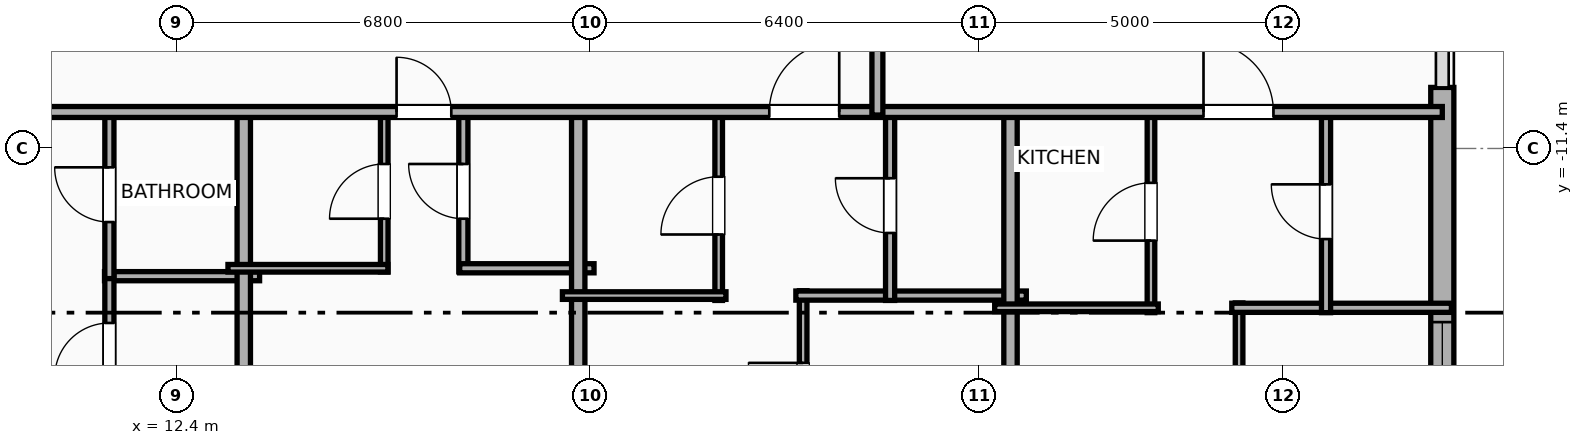
"""IFC4 building model, lengths in metres.
Left out: names, types, materials, properties, quantities, classifications, styles, units other than length and angle.
Written with IfcOpenShell. Run it as: python <this file> out.ifc"""

import sys

from ifc_helpers import new_model, si_unit, direction, frame, frame_2d, origin, place, context, subcontext, project, spatial, rectangle, extrude, element, fill, save


model = new_model("IFC4")
c1 = context("Model", 3, precision=1e-05, world=origin(), true_north=direction((0.0, 1.0)))
c2 = subcontext(c1, "Body", "Model", "MODEL_VIEW")
j1 = project(units=[si_unit("LENGTHUNIT", "METRE"), si_unit("PLANEANGLEUNIT", "RADIAN")], contexts=[c1])
p1 = place(None, origin())
s1 = spatial("IfcSite", under=j1, at=p1, CompositionType="ELEMENT")
p2 = place(p1, origin())
s2 = spatial("IfcBuilding", under=s1, at=p2, CompositionType="ELEMENT")
p3 = place(p2, frame((0.0, 0.0, 85.8)))
s3 = spatial("IfcBuildingStorey", under=s2, at=p3, CompositionType="ELEMENT", Elevation=85.8)
p4 = place(p3, frame((33.21, -10.396, 0.0), z_axis=(0.0, 0.0, 1.0), x_axis=(0.0, -1.0, 0.0)))
e1 = element("IfcWall", 1, at=p4, inside=s3, PredefinedType="ELEMENTEDWALL", context=c2, shape_type="SweptSolid", body=[
    extrude(rectangle(XDim=6.185, YDim=0.38, at=frame_2d((3.093, 0.0))), origin(), (0.0, 0.0, 1.0), 2.54),
])
p5 = place(p4, frame((3.86, 0.0, 0.55)))
e2 = element("IfcOpeningElement", 2, at=p5, cuts=e1, PredefinedType="OPENING", context=c2, shape_type="SweptSolid", body=[
    extrude(rectangle(XDim=1.2, YDim=1.15, at=frame_2d((0.6, 0.575))), frame((0.0, 0.2, 0.0), z_axis=(0.0, -1.0, 0.0), x_axis=(1.0, 0.0, 0.0)), (0.0, 0.0, 1.0), 0.4),
])
p6 = place(p3, frame((11.21, -13.5, 0.0), z_axis=(0.0, 0.0, 1.0), x_axis=(1.0, 0.0, 0.0)))
e3 = element("IfcWall", 3, at=p6, inside=s3, PredefinedType="PLUMBINGWALL", context=c2, shape_type="SweptSolid", body=[
    extrude(rectangle(XDim=2.55, YDim=0.15, at=frame_2d((1.275, 0.0))), origin(), (0.0, 0.0, 1.0), 3.65),
])
p7 = place(p3, frame((11.29, -20.458, 0.0), z_axis=(0.0, 0.0, 1.0), x_axis=(0.0, 1.0, 0.0)))
e4 = element("IfcWall", 4, at=p7, inside=s3, PredefinedType="PLUMBINGWALL", context=c2, shape_type="SweptSolid", body=[
    extrude(rectangle(XDim=6.998, YDim=0.15, at=frame_2d((3.499, 0.0))), origin(), (0.0, 0.0, 1.0), 3.65),
])
p8 = place(p7, frame((5.288, 0.0, 0.0)))
e5 = element("IfcOpeningElement", 5, at=p8, cuts=e4, PredefinedType="OPENING", context=c2, shape_type="SweptSolid", body=[
    extrude(rectangle(XDim=0.9, YDim=2.05, at=frame_2d((0.45, 1.025))), frame((0.0, 0.085, 0.0), z_axis=(0.0, -1.0, 0.0), x_axis=(1.0, 0.0, 0.0)), (0.0, 0.0, 1.0), 0.17),
])
p9 = place(p3, frame((11.29, -13.54, 0.0), z_axis=(0.0, 0.0, 1.0), x_axis=(0.0, 1.0, 0.0)))
e6 = element("IfcWall", 6, at=p9, inside=s3, PredefinedType="PLUMBINGWALL", context=c2, shape_type="SweptSolid", body=[
    extrude(rectangle(XDim=2.76, YDim=0.15, at=frame_2d((1.38, 0.0))), origin(), (0.0, 0.0, 1.0), 3.65),
])
p10 = place(p9, frame((0.93, 0.0, 0.0)))
e7 = element("IfcOpeningElement", 7, at=p10, cuts=e6, PredefinedType="OPENING", context=c2, shape_type="SweptSolid", body=[
    extrude(rectangle(XDim=0.9, YDim=2.05, at=frame_2d((0.45, 1.025))), frame((0.0, 0.085, 0.0), z_axis=(0.0, -1.0, 0.0), x_axis=(1.0, 0.0, 0.0)), (0.0, 0.0, 1.0), 0.17),
])
p11 = place(p3, frame((13.5, -20.41, 0.0), z_axis=(0.0, 0.0, 1.0), x_axis=(0.0, 1.0, 0.0)))
e8 = element("IfcWall", 8, at=p11, inside=s3, PredefinedType="PARTITIONING", context=c2, shape_type="SweptSolid", body=[
    extrude(rectangle(XDim=9.69, YDim=0.22, at=frame_2d((4.845, 0.0))), origin(), (0.0, 0.0, 1.0), 3.65),
])
p12 = place(p3, frame((15.81, -13.43, 0.0), z_axis=(0.0, 0.0, 1.0), x_axis=(0.0, 1.0, 0.0)))
e9 = element("IfcWall", 9, at=p12, inside=s3, PredefinedType="PARTITIONING", context=c2, shape_type="SweptSolid", body=[
    extrude(rectangle(XDim=2.65, YDim=0.125, at=frame_2d((1.325, 0.0))), origin(), (0.0, 0.0, 1.0), 3.65),
])
p13 = place(p12, frame((0.875, 0.0, 0.0)))
e10 = element("IfcOpeningElement", 10, at=p13, cuts=e9, PredefinedType="OPENING", context=c2, shape_type="SweptSolid", body=[
    extrude(rectangle(XDim=0.9, YDim=2.05, at=frame_2d((0.45, 1.025))), frame((0.0, 0.073, 0.0), z_axis=(0.0, -1.0, 0.0), x_axis=(1.0, 0.0, 0.0)), (0.0, 0.0, 1.0), 0.145),
])
p14 = place(p3, frame((17.111, -13.43, 0.0), z_axis=(0.0, 0.0, 1.0), x_axis=(0.0, 1.0, 0.0)))
e11 = element("IfcWall", 11, at=p14, inside=s3, PredefinedType="PLUMBINGWALL", context=c2, shape_type="SweptSolid", body=[
    extrude(rectangle(XDim=2.65, YDim=0.15, at=frame_2d((1.325, 0.0))), origin(), (0.0, 0.0, 1.0), 3.65),
])
p15 = place(p14, frame((0.875, 0.0, 0.0)))
e12 = element("IfcOpeningElement", 12, at=p15, cuts=e11, PredefinedType="OPENING", context=c2, shape_type="SweptSolid", body=[
    extrude(rectangle(XDim=0.9, YDim=2.05, at=frame_2d((0.45, 1.025))), frame((0.0, 0.085, 0.0), z_axis=(0.0, -1.0, 0.0), x_axis=(1.0, 0.0, 0.0)), (0.0, 0.0, 1.0), 0.17),
])
p16 = place(p3, frame((13.24, -13.37, 0.0), z_axis=(0.0, 0.0, 1.0), x_axis=(1.0, 0.0, 0.0)))
e13 = element("IfcWall", 13, at=p16, inside=s3, PredefinedType="PARTITIONING", context=c2, shape_type="SweptSolid", body=[
    extrude(rectangle(XDim=2.63, YDim=0.125, at=frame_2d((1.315, 0.0))), origin(), (0.0, 0.0, 1.0), 3.65),
])
p17 = place(p3, frame((17.051, -13.37, 0.0), z_axis=(0.0, 0.0, 1.0), x_axis=(1.0, 0.0, 0.0)))
e14 = element("IfcWall", 14, at=p17, inside=s3, PredefinedType="PLUMBINGWALL", context=c2, shape_type="SweptSolid", body=[
    extrude(rectangle(XDim=2.209, YDim=0.15, at=frame_2d((1.104, 0.0))), origin(), (0.0, 0.0, 1.0), 3.65),
])
p18 = place(p3, frame((19.0, -20.41, 0.0), z_axis=(0.0, 0.0, 1.0), x_axis=(0.0, 1.0, 0.0)))
e15 = element("IfcWall", 15, at=p18, inside=s3, PredefinedType="PARTITIONING", context=c2, shape_type="SweptSolid", body=[
    extrude(rectangle(XDim=9.69, YDim=0.22, at=frame_2d((4.845, 0.0))), origin(), (0.0, 0.0, 1.0), 2.54),
])
p19 = place(p3, frame((22.699, -20.56, 0.0), z_axis=(0.0, 0.0, 1.0), x_axis=(0.0, 1.0, 0.0)))
e16 = element("IfcWall", 16, at=p19, inside=s3, PredefinedType="PARTITIONING", context=c2, shape_type="SweptSolid", body=[
    extrude(rectangle(XDim=6.821, YDim=0.125, at=frame_2d((3.411, 0.0))), origin(), (0.0, 0.0, 1.0), 3.65),
])
p20 = place(p19, frame((4.734, 0.0, 0.0)))
e17 = element("IfcOpeningElement", 17, at=p20, cuts=e16, PredefinedType="OPENING", context=c2, shape_type="SweptSolid", body=[
    extrude(rectangle(XDim=0.9, YDim=2.05, at=frame_2d((0.45, 1.025))), frame((0.0, 0.073, 0.0), z_axis=(0.0, -1.0, 0.0), x_axis=(1.0, 0.0, 0.0)), (0.0, 0.0, 1.0), 0.145),
])
p21 = place(p3, frame((22.579, -13.819, 0.0), z_axis=(0.0, 0.0, 1.0), x_axis=(1.0, 0.0, 0.0)))
e18 = element("IfcWall", 18, at=p21, inside=s3, PredefinedType="PLUMBINGWALL", context=c2, shape_type="SweptSolid", body=[
    extrude(rectangle(XDim=3.79, YDim=0.15, at=frame_2d((1.895, 0.0))), origin(), (0.0, 0.0, 1.0), 3.65),
])
p22 = place(p3, frame((21.31, -13.899, 0.0), z_axis=(0.0, 0.0, 1.0), x_axis=(0.0, 1.0, 0.0)))
e19 = element("IfcWall", 19, at=p22, inside=s3, PredefinedType="PARTITIONING", context=c2, shape_type="SweptSolid", body=[
    extrude(rectangle(XDim=3.119, YDim=0.125, at=frame_2d((1.56, 0.0))), origin(), (0.0, 0.0, 1.0), 3.65),
])
p23 = place(p22, frame((1.084, 0.0, 0.0)))
e20 = element("IfcOpeningElement", 20, at=p23, cuts=e19, PredefinedType="OPENING", context=c2, shape_type="SweptSolid", body=[
    extrude(rectangle(XDim=0.95, YDim=2.05, at=frame_2d((0.475, 1.025))), frame((0.0, 0.073, 0.0), z_axis=(0.0, -1.0, 0.0), x_axis=(1.0, 0.0, 0.0)), (0.0, 0.0, 1.0), 0.145),
])
p24 = place(p3, frame((18.74, -13.819, 0.0), z_axis=(0.0, 0.0, 1.0), x_axis=(1.0, 0.0, 0.0)))
e21 = element("IfcWall", 21, at=p24, inside=s3, PredefinedType="PARTITIONING", context=c2, shape_type="SweptSolid", body=[
    extrude(rectangle(XDim=2.69, YDim=0.125, at=frame_2d((1.345, 0.0))), origin(), (0.0, 0.0, 1.0), 3.65),
])
p25 = place(p3, frame((24.129, -13.899, 0.0), z_axis=(0.0, 0.0, 1.0), x_axis=(0.0, 1.0, 0.0)))
e22 = element("IfcWall", 22, at=p25, inside=s3, PredefinedType="PLUMBINGWALL", context=c2, shape_type="SweptSolid", body=[
    extrude(rectangle(XDim=3.119, YDim=0.15, at=frame_2d((1.56, 0.0))), origin(), (0.0, 0.0, 1.0), 3.65),
])
p26 = place(p25, frame((1.11, 0.0, 0.0)))
e23 = element("IfcOpeningElement", 23, at=p26, cuts=e22, PredefinedType="OPENING", context=c2, shape_type="SweptSolid", body=[
    extrude(rectangle(XDim=0.9, YDim=2.05, at=frame_2d((0.45, 1.025))), frame((0.0, 0.085, 0.0), z_axis=(0.0, -1.0, 0.0), x_axis=(1.0, 0.0, 0.0)), (0.0, 0.0, 1.0), 0.17),
])
p27 = place(p3, frame((26.109, -20.41, 0.0), z_axis=(0.0, 0.0, 1.0), x_axis=(0.0, 1.0, 0.0)))
e24 = element("IfcWall", 24, at=p27, inside=s3, PredefinedType="PARTITIONING", context=c2, shape_type="SweptSolid", body=[
    extrude(rectangle(XDim=9.69, YDim=0.22, at=frame_2d((4.845, 0.0))), origin(), (0.0, 0.0, 1.0), 3.65),
])
p28 = place(p3, frame((29.868, -20.466, 0.0), z_axis=(0.0, 0.0, 1.0), x_axis=(0.0, 1.0, 0.0)))
e25 = element("IfcWall", 25, at=p28, inside=s3, PredefinedType="PARTITIONING", context=c2, shape_type="SweptSolid", body=[
    extrude(rectangle(XDim=6.526, YDim=0.125, at=frame_2d((3.263, 0.0))), origin(), (0.0, 0.0, 1.0), 3.65),
])
p29 = place(p28, frame((4.51, 0.0, 0.0)))
e26 = element("IfcOpeningElement", 26, at=p29, cuts=e25, PredefinedType="OPENING", context=c2, shape_type="SweptSolid", body=[
    extrude(rectangle(XDim=0.9, YDim=2.05, at=frame_2d((0.45, 1.025))), frame((0.0, 0.073, 0.0), z_axis=(0.0, -1.0, 0.0), x_axis=(1.0, 0.0, 0.0)), (0.0, 0.0, 1.0), 0.145),
])
p30 = place(p3, frame((29.748, -14.02, 0.0), z_axis=(0.0, 0.0, 1.0), x_axis=(1.0, 0.0, 0.0)))
e27 = element("IfcWall", 27, at=p30, inside=s3, PredefinedType="PLUMBINGWALL", context=c2, shape_type="SweptSolid", body=[
    extrude(rectangle(XDim=3.612, YDim=0.15, at=frame_2d((1.806, 0.0))), origin(), (0.0, 0.0, 1.0), 3.65),
])
p31 = place(p3, frame((28.419, -14.1, 0.0), z_axis=(0.0, 0.0, 1.0), x_axis=(0.0, 1.0, 0.0)))
e28 = element("IfcWall", 28, at=p31, inside=s3, PredefinedType="PARTITIONING", context=c2, shape_type="SweptSolid", body=[
    extrude(rectangle(XDim=3.32, YDim=0.125, at=frame_2d((1.66, 0.0))), origin(), (0.0, 0.0, 1.0), 3.65),
])
p32 = place(p31, frame((1.185, 0.0, 0.0)))
e29 = element("IfcOpeningElement", 29, at=p32, cuts=e28, PredefinedType="OPENING", context=c2, shape_type="SweptSolid", body=[
    extrude(rectangle(XDim=0.95, YDim=2.05, at=frame_2d((0.475, 1.025))), frame((0.0, 0.073, 0.0), z_axis=(0.0, -1.0, 0.0), x_axis=(1.0, 0.0, 0.0)), (0.0, 0.0, 1.0), 0.145),
])
p33 = place(p3, frame((25.849, -14.02, 0.0), z_axis=(0.0, 0.0, 1.0), x_axis=(1.0, 0.0, 0.0)))
e30 = element("IfcWall", 30, at=p33, inside=s3, PredefinedType="PARTITIONING", context=c2, shape_type="SweptSolid", body=[
    extrude(rectangle(XDim=2.69, YDim=0.125, at=frame_2d((1.345, 0.0))), origin(), (0.0, 0.0, 1.0), 3.65),
])
p34 = place(p3, frame((31.298, -14.1, 0.0), z_axis=(0.0, 0.0, 1.0), x_axis=(0.0, 1.0, 0.0)))
e31 = element("IfcWall", 31, at=p34, inside=s3, PredefinedType="PLUMBINGWALL", context=c2, shape_type="SweptSolid", body=[
    extrude(rectangle(XDim=3.32, YDim=0.15, at=frame_2d((1.66, 0.0))), origin(), (0.0, 0.0, 1.0), 3.65),
])
p35 = place(p34, frame((1.21, 0.0, 0.0)))
e32 = element("IfcOpeningElement", 32, at=p35, cuts=e31, PredefinedType="OPENING", context=c2, shape_type="SweptSolid", body=[
    extrude(rectangle(XDim=0.9, YDim=2.05, at=frame_2d((0.45, 1.025))), frame((0.0, 0.085, 0.0), z_axis=(0.0, -1.0, 0.0), x_axis=(1.0, 0.0, 0.0)), (0.0, 0.0, 1.0), 0.17),
])
p36 = place(p3, frame((-29.21, -10.8, 0.0), z_axis=(0.0, 0.0, 1.0), x_axis=(1.0, 0.0, 0.0)))
e33 = element("IfcWall", 33, at=p36, inside=s3, PredefinedType="PARTITIONING", context=c2, shape_type="SweptSolid", body=[
    extrude(rectangle(XDim=62.42, YDim=0.18, at=frame_2d((31.21, 0.0))), origin(), (0.0, 0.0, 1.0), 3.65),
])
p37 = place(p36, frame((3.357, 0.0, 0.0)))
e34 = element("IfcOpeningElement", 34, at=p37, cuts=e33, PredefinedType="OPENING", context=c2, shape_type="SweptSolid", body=[
    extrude(rectangle(XDim=1.15, YDim=2.05, at=frame_2d((0.575, 1.025))), frame((0.0, 0.1, 0.0), z_axis=(0.0, -1.0, 0.0), x_axis=(1.0, 0.0, 0.0)), (0.0, 0.0, 1.0), 0.2),
])
p38 = place(p36, frame((10.998, 0.0, 0.0)))
e35 = element("IfcOpeningElement", 35, at=p38, cuts=e33, PredefinedType="OPENING", context=c2, shape_type="SweptSolid", body=[
    extrude(rectangle(XDim=1.15, YDim=2.05, at=frame_2d((0.575, 1.025))), frame((0.0, 0.1, 0.0), z_axis=(0.0, -1.0, 0.0), x_axis=(1.0, 0.0, 0.0)), (0.0, 0.0, 1.0), 0.2),
])
p39 = place(p36, frame((18.482, 0.0, 0.0)))
e36 = element("IfcOpeningElement", 36, at=p39, cuts=e33, PredefinedType="OPENING", context=c2, shape_type="SweptSolid", body=[
    extrude(rectangle(XDim=1.15, YDim=2.05, at=frame_2d((0.575, 1.025))), frame((0.0, 0.1, 0.0), z_axis=(0.0, -1.0, 0.0), x_axis=(1.0, 0.0, 0.0)), (0.0, 0.0, 1.0), 0.2),
])
p40 = place(p36, frame((23.962, 0.0, 0.0)))
e37 = element("IfcOpeningElement", 37, at=p40, cuts=e33, PredefinedType="OPENING", context=c2, shape_type="SweptSolid", body=[
    extrude(rectangle(XDim=1.15, YDim=2.05, at=frame_2d((0.575, 1.025))), frame((0.0, 0.1, 0.0), z_axis=(0.0, -1.0, 0.0), x_axis=(1.0, 0.0, 0.0)), (0.0, 0.0, 1.0), 0.2),
])
p41 = place(p36, frame((29.524, 0.0, 0.0)))
e38 = element("IfcOpeningElement", 38, at=p41, cuts=e33, PredefinedType="OPENING", context=c2, shape_type="SweptSolid", body=[
    extrude(rectangle(XDim=1.15, YDim=2.05, at=frame_2d((0.575, 1.025))), frame((0.0, 0.1, 0.0), z_axis=(0.0, -1.0, 0.0), x_axis=(1.0, 0.0, 0.0)), (0.0, 0.0, 1.0), 0.2),
])
p42 = place(p36, frame((34.218, 0.0, 0.0)))
e39 = element("IfcOpeningElement", 39, at=p42, cuts=e33, PredefinedType="OPENING", context=c2, shape_type="SweptSolid", body=[
    extrude(rectangle(XDim=0.9, YDim=2.05, at=frame_2d((0.45, 1.025))), frame((0.0, 0.1, 0.0), z_axis=(0.0, -1.0, 0.0), x_axis=(1.0, 0.0, 0.0)), (0.0, 0.0, 1.0), 0.2),
])
p43 = place(p36, frame((38.313, 0.0, 0.0)))
e40 = element("IfcOpeningElement", 40, at=p43, cuts=e33, PredefinedType="OPENING", context=c2, shape_type="SweptSolid", body=[
    extrude(rectangle(XDim=1.15, YDim=2.05, at=frame_2d((0.575, 1.025))), frame((0.0, 0.1, 0.0), z_axis=(0.0, -1.0, 0.0), x_axis=(1.0, 0.0, 0.0)), (0.0, 0.0, 1.0), 0.2),
])
p44 = place(p36, frame((45.223, 0.0, 0.0)))
e41 = element("IfcOpeningElement", 41, at=p44, cuts=e33, PredefinedType="OPENING", context=c2, shape_type="SweptSolid", body=[
    extrude(rectangle(XDim=0.9, YDim=2.05, at=frame_2d((0.45, 1.025))), frame((0.0, 0.1, 0.0), z_axis=(0.0, -1.0, 0.0), x_axis=(1.0, 0.0, 0.0)), (0.0, 0.0, 1.0), 0.2),
])
p45 = place(p36, frame((51.352, 0.0, 0.0)))
e42 = element("IfcOpeningElement", 42, at=p45, cuts=e33, PredefinedType="OPENING", context=c2, shape_type="SweptSolid", body=[
    extrude(rectangle(XDim=1.15, YDim=2.05, at=frame_2d((0.575, 1.025))), frame((0.0, 0.1, 0.0), z_axis=(0.0, -1.0, 0.0), x_axis=(1.0, 0.0, 0.0)), (0.0, 0.0, 1.0), 0.2),
])
p46 = place(p36, frame((58.493, 0.0, 0.0)))
e43 = element("IfcOpeningElement", 43, at=p46, cuts=e33, PredefinedType="OPENING", context=c2, shape_type="SweptSolid", body=[
    extrude(rectangle(XDim=1.15, YDim=2.05, at=frame_2d((0.575, 1.025))), frame((0.0, 0.1, 0.0), z_axis=(0.0, -1.0, 0.0), x_axis=(1.0, 0.0, 0.0)), (0.0, 0.0, 1.0), 0.2),
])
p47 = place(p3, frame((23.92, -10.85, 0.0), z_axis=(0.0, 0.0, 1.0), x_axis=(0.0, 1.0, 0.0)))
e44 = element("IfcWall", 44, at=p47, inside=s3, PredefinedType="PARTITIONING", context=c2, shape_type="SweptSolid", body=[
    extrude(rectangle(XDim=21.7, YDim=0.18, at=frame_2d((10.85, 0.0))), origin(), (0.0, 0.0, 1.0), 3.65),
])
p48 = place(p47, frame((18.835, 0.0, 0.0)))
e45 = element("IfcOpeningElement", 45, at=p48, cuts=e44, PredefinedType="OPENING", context=c2, shape_type="SweptSolid", body=[
    extrude(rectangle(XDim=0.95, YDim=2.05, at=frame_2d((0.475, 1.025))), frame((0.0, 0.1, 0.0), z_axis=(0.0, -1.0, 0.0), x_axis=(1.0, 0.0, 0.0)), (0.0, 0.0, 1.0), 0.2),
])
p49 = place(p5, origin())
e46 = element("IfcWindow", 46, at=p49, inside=s3, PartitioningType="SINGLE_PANEL", PredefinedType="WINDOW", context=c2, shape_type="SweptSolid", body=[
    extrude(rectangle(XDim=1.2, YDim=1.15, at=frame_2d((0.6, 0.575))), frame((0.0, 0.03, 0.0), z_axis=(0.0, -1.0, 0.0), x_axis=(1.0, 0.0, 0.0)), (0.0, 0.0, 1.0), 0.06),
])
fill(e2, e46)
p50 = place(p8, origin())
e47 = element("IfcDoor", 47, at=p50, inside=s3, OperationType="SINGLE_SWING_LEFT", PredefinedType="DOOR", context=c2, shape_type="SweptSolid", body=[
    extrude(rectangle(XDim=0.9, YDim=2.05, at=frame_2d((0.45, 1.025))), frame((0.0, 0.025, 0.0), z_axis=(0.0, -1.0, 0.0), x_axis=(1.0, 0.0, 0.0)), (0.0, 0.0, 1.0), 0.05),
])
fill(e5, e47)
p51 = place(p10, origin())
e48 = element("IfcDoor", 48, at=p51, inside=s3, OperationType="SINGLE_SWING_RIGHT", PredefinedType="DOOR", context=c2, shape_type="SweptSolid", body=[
    extrude(rectangle(XDim=0.9, YDim=2.05, at=frame_2d((0.45, 1.025))), frame((0.0, 0.025, 0.0), z_axis=(0.0, -1.0, 0.0), x_axis=(1.0, 0.0, 0.0)), (0.0, 0.0, 1.0), 0.05),
])
fill(e7, e48)
p52 = place(p13, origin())
e49 = element("IfcDoor", 49, at=p52, inside=s3, OperationType="SINGLE_SWING_LEFT", PredefinedType="DOOR", context=c2, shape_type="SweptSolid", body=[
    extrude(rectangle(XDim=0.9, YDim=2.05, at=frame_2d((0.45, 1.025))), frame((0.0, 0.025, 0.0), z_axis=(0.0, -1.0, 0.0), x_axis=(1.0, 0.0, 0.0)), (0.0, 0.0, 1.0), 0.05),
])
fill(e10, e49)
p53 = place(p15, origin())
e50 = element("IfcDoor", 50, at=p53, inside=s3, OperationType="SINGLE_SWING_RIGHT", PredefinedType="DOOR", context=c2, shape_type="SweptSolid", body=[
    extrude(rectangle(XDim=0.9, YDim=2.05, at=frame_2d((0.45, 1.025))), frame((0.0, 0.025, 0.0), z_axis=(0.0, -1.0, 0.0), x_axis=(1.0, 0.0, 0.0)), (0.0, 0.0, 1.0), 0.05),
])
fill(e12, e50)
p54 = place(p20, origin())
e51 = element("IfcDoor", 51, at=p54, inside=s3, OperationType="SINGLE_SWING_RIGHT", PredefinedType="DOOR", context=c2, shape_type="SweptSolid", body=[
    extrude(rectangle(XDim=0.9, YDim=2.05, at=frame_2d((0.45, 1.025))), frame((0.0, 0.025, 0.0), z_axis=(0.0, -1.0, 0.0), x_axis=(1.0, 0.0, 0.0)), (0.0, 0.0, 1.0), 0.05),
])
fill(e17, e51)
p55 = place(p23, origin())
e52 = element("IfcDoor", 52, at=p55, inside=s3, OperationType="SINGLE_SWING_LEFT", PredefinedType="DOOR", context=c2, shape_type="SweptSolid", body=[
    extrude(rectangle(XDim=0.95, YDim=2.05, at=frame_2d((0.475, 1.025))), frame((0.0, 0.025, 0.0), z_axis=(0.0, -1.0, 0.0), x_axis=(1.0, 0.0, 0.0)), (0.0, 0.0, 1.0), 0.05),
])
fill(e20, e52)
p56 = place(p26, origin())
e53 = element("IfcDoor", 53, at=p56, inside=s3, OperationType="SINGLE_SWING_RIGHT", PredefinedType="DOOR", context=c2, shape_type="SweptSolid", body=[
    extrude(rectangle(XDim=0.9, YDim=2.05, at=frame_2d((0.45, 1.025))), frame((0.0, 0.025, 0.0), z_axis=(0.0, -1.0, 0.0), x_axis=(1.0, 0.0, 0.0)), (0.0, 0.0, 1.0), 0.05),
])
fill(e23, e53)
p57 = place(p32, origin())
e54 = element("IfcDoor", 54, at=p57, inside=s3, OperationType="SINGLE_SWING_LEFT", PredefinedType="DOOR", context=c2, shape_type="SweptSolid", body=[
    extrude(rectangle(XDim=0.95, YDim=2.05, at=frame_2d((0.475, 1.025))), frame((0.0, 0.025, 0.0), z_axis=(0.0, -1.0, 0.0), x_axis=(1.0, 0.0, 0.0)), (0.0, 0.0, 1.0), 0.05),
])
fill(e29, e54)
p58 = place(p35, origin())
e55 = element("IfcDoor", 55, at=p58, inside=s3, OperationType="SINGLE_SWING_RIGHT", PredefinedType="DOOR", context=c2, shape_type="SweptSolid", body=[
    extrude(rectangle(XDim=0.9, YDim=2.05, at=frame_2d((0.45, 1.025))), frame((0.0, 0.025, 0.0), z_axis=(0.0, -1.0, 0.0), x_axis=(1.0, 0.0, 0.0)), (0.0, 0.0, 1.0), 0.05),
])
fill(e32, e55)
p59 = place(p44, origin())
e56 = element("IfcDoor", 56, at=p59, inside=s3, OperationType="SINGLE_SWING_LEFT", PredefinedType="DOOR", context=c2, shape_type="SweptSolid", body=[
    extrude(rectangle(XDim=0.9, YDim=2.05, at=frame_2d((0.45, 1.025))), frame((0.0, 0.025, 0.0), z_axis=(0.0, -1.0, 0.0), x_axis=(1.0, 0.0, 0.0)), (0.0, 0.0, 1.0), 0.05),
])
fill(e41, e56)
p60 = place(p45, origin())
e57 = element("IfcDoor", 57, at=p60, inside=s3, OperationType="SINGLE_SWING_RIGHT", PredefinedType="DOOR", context=c2, shape_type="SweptSolid", body=[
    extrude(rectangle(XDim=1.15, YDim=2.05, at=frame_2d((0.575, 1.025))), frame((0.0, 0.025, 0.0), z_axis=(0.0, -1.0, 0.0), x_axis=(1.0, 0.0, 0.0)), (0.0, 0.0, 1.0), 0.05),
])
fill(e42, e57)
p61 = place(p46, origin())
e58 = element("IfcDoor", 58, at=p61, inside=s3, OperationType="SINGLE_SWING_LEFT", PredefinedType="DOOR", context=c2, shape_type="SweptSolid", body=[
    extrude(rectangle(XDim=1.15, YDim=2.05, at=frame_2d((0.575, 1.025))), frame((0.0, 0.025, 0.0), z_axis=(0.0, -1.0, 0.0), x_axis=(1.0, 0.0, 0.0)), (0.0, 0.0, 1.0), 0.05),
])
fill(e43, e58)
save(model, sys.argv[1])
